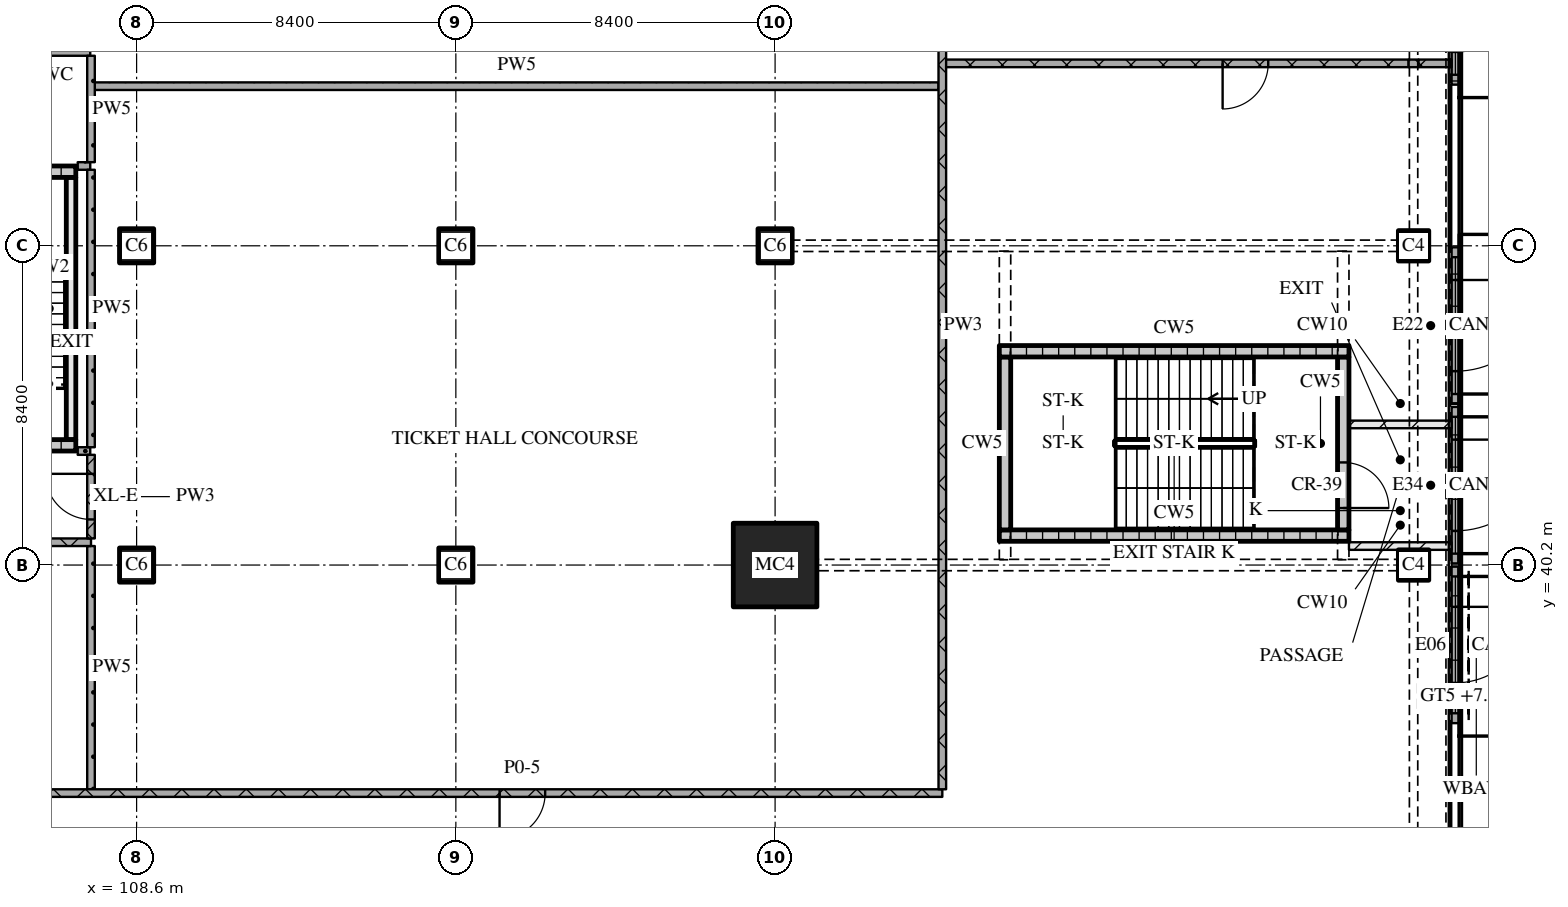
"""IFC4 building model, lengths in metres.
Left out: names, types, materials, properties, quantities, classifications, styles, units other than length and angle.
Written with IfcOpenShell. Run it as: python <this file> out.ifc"""

import sys

from ifc_helpers import new_model, si_unit, direction, frame, frame_2d, origin, origin_2d, place, context, subcontext, project, spatial, rectangle, extrude, element, fill, save


model = new_model("IFC4")
c1 = context("Model", 3, precision=1e-05, world=origin(), true_north=direction((0.0, 1.0)))
c2 = subcontext(c1, "Body", "Model", "MODEL_VIEW")
j1 = project(units=[si_unit("LENGTHUNIT", "METRE"), si_unit("PLANEANGLEUNIT", "RADIAN")], contexts=[c1])
p1 = place(None, origin())
s1 = spatial("IfcSite", under=j1, at=p1, CompositionType="ELEMENT")
p2 = place(p1, origin())
s2 = spatial("IfcBuilding", under=s1, at=p2, CompositionType="ELEMENT")
p3 = place(p2, origin())
s3 = spatial("IfcBuildingStorey", under=s2, at=p3, CompositionType="ELEMENT", Elevation=0.0)
for number, where, z_axis, x_axis in (
    (1, (108.6, 40.2, 0.0), (0.0, 0.0, 1.0), (1.0, 0.0, 0.0)),
    (2, (108.6, 48.6, 0.0), (0.0, 0.0, 1.0), (1.0, 0.0, 0.0)),
    (3, (117.0, 40.2, 0.0), (0.0, 0.0, 1.0), (1.0, 0.0, 0.0)),
    (4, (117.0, 48.6, 0.0), (0.0, 0.0, 1.0), (1.0, 0.0, 0.0)),
):
    element("IfcColumn", number, at=place(p3, frame(where, z_axis=z_axis, x_axis=x_axis)), inside=s3, PredefinedType="COLUMN", context=c2, shape_type="SweptSolid", body=[
        extrude(rectangle(XDim=0.9, YDim=0.9, at=origin_2d()), origin(), (0.0, 0.0, 1.0), 9.0),
    ])
p4 = place(p3, frame((125.4, 40.2, 0.0), z_axis=(0.0, 0.0, 1.0), x_axis=(1.0, 0.0, 0.0)))
e5 = element("IfcColumn", 5, at=p4, inside=s3, PredefinedType="COLUMN", context=c2, shape_type="SweptSolid", body=[
    extrude(rectangle(XDim=2.2, YDim=2.2, at=origin_2d()), origin(), (0.0, 0.0, 1.0), 9.0),
])
p5 = place(p3, frame((125.4, 48.6, 0.0), z_axis=(0.0, 0.0, 1.0), x_axis=(1.0, 0.0, 0.0)))
e6 = element("IfcColumn", 6, at=p5, inside=s3, PredefinedType="COLUMN", context=c2, shape_type="SweptSolid", body=[
    extrude(rectangle(XDim=0.9, YDim=0.9, at=origin_2d()), origin(), (0.0, 0.0, 1.0), 9.0),
])
for number, where, z_axis, x_axis in (
    (7, (142.2, 40.2, 0.0), (0.0, 0.0, 1.0), (1.0, 0.0, 0.0)),
    (8, (142.2, 48.6, 0.0), (0.0, 0.0, 1.0), (1.0, 0.0, 0.0)),
):
    element("IfcColumn", number, at=place(p3, frame(where, z_axis=z_axis, x_axis=x_axis)), inside=s3, PredefinedType="COLUMN", context=c2, shape_type="SweptSolid", body=[
        extrude(rectangle(XDim=0.8, YDim=0.8, at=origin_2d()), origin(), (0.0, 0.0, 1.0), 9.0),
    ])
p6 = place(p3, frame((143.3, 40.16, 0.0), z_axis=(0.0, 0.0, 1.0), x_axis=(0.0, -1.0, 0.0)))
e9 = element("IfcWall", 9, at=p6, inside=s3, PredefinedType="SOLIDWALL", context=c2, shape_type="SweptSolid", body=[
    extrude(rectangle(XDim=4.12, YDim=0.2, at=frame_2d((2.06, 0.0))), origin(), (0.0, 0.0, 1.0), 8.7),
])
p7 = place(p6, frame((1.06, 0.0, 0.0)))
e10 = element("IfcOpeningElement", 10, at=p7, cuts=e9, PredefinedType="OPENING", context=c2, shape_type="SweptSolid", body=[
    extrude(rectangle(XDim=2.0, YDim=2.4, at=frame_2d((1.0, 1.2))), frame((0.0, 0.11, 0.0), z_axis=(0.0, -1.0, 0.0), x_axis=(1.0, 0.0, 0.0)), (0.0, 0.0, 1.0), 0.22),
])
p8 = place(p6, frame((0.26, 0.0, 2.7)))
e11 = element("IfcOpeningElement", 11, at=p8, cuts=e9, PredefinedType="OPENING", context=c2, shape_type="SweptSolid", body=[
    extrude(rectangle(XDim=3.6, YDim=5.6, at=frame_2d((1.8, 2.8))), frame((0.0, 0.11, 0.0), z_axis=(0.0, -1.0, 0.0), x_axis=(1.0, 0.0, 0.0)), (0.0, 0.0, 1.0), 0.22),
])
p9 = place(p3, frame((143.3, 56.96, 0.0), z_axis=(0.0, 0.0, 1.0), x_axis=(0.0, -1.0, 0.0)))
e12 = element("IfcWall", 12, at=p9, inside=s3, PredefinedType="SOLIDWALL", context=c2, shape_type="SweptSolid", body=[
    extrude(rectangle(XDim=4.12, YDim=0.2, at=frame_2d((2.06, 0.0))), origin(), (0.0, 0.0, 1.0), 8.7),
])
p10 = place(p9, frame((0.86, 0.0, 0.0)))
e13 = element("IfcOpeningElement", 13, at=p10, cuts=e12, PredefinedType="OPENING", context=c2, shape_type="SweptSolid", body=[
    extrude(rectangle(XDim=2.4, YDim=2.4, at=frame_2d((1.2, 1.2))), frame((0.0, 0.11, 0.0), z_axis=(0.0, -1.0, 0.0), x_axis=(1.0, 0.0, 0.0)), (0.0, 0.0, 1.0), 0.22),
])
p11 = place(p9, frame((0.26, 0.0, 2.7)))
e14 = element("IfcOpeningElement", 14, at=p11, cuts=e12, PredefinedType="OPENING", context=c2, shape_type="SweptSolid", body=[
    extrude(rectangle(XDim=3.6, YDim=5.6, at=frame_2d((1.8, 2.8))), frame((0.0, 0.11, 0.0), z_axis=(0.0, -1.0, 0.0), x_axis=(1.0, 0.0, 0.0)), (0.0, 0.0, 1.0), 0.22),
])
p12 = place(p3, frame((143.3, 48.56, 0.0), z_axis=(0.0, 0.0, 1.0), x_axis=(0.0, -1.0, 0.0)))
e15 = element("IfcWall", 15, at=p12, inside=s3, PredefinedType="SOLIDWALL", context=c2, shape_type="SweptSolid", body=[
    extrude(rectangle(XDim=4.12, YDim=0.2, at=frame_2d((2.06, 0.0))), origin(), (0.0, 0.0, 1.0), 8.7),
])
p13 = place(p12, frame((0.86, 0.0, 0.0)))
e16 = element("IfcOpeningElement", 16, at=p13, cuts=e15, PredefinedType="OPENING", context=c2, shape_type="SweptSolid", body=[
    extrude(rectangle(XDim=2.4, YDim=2.4, at=frame_2d((1.2, 1.2))), frame((0.0, 0.11, 0.0), z_axis=(0.0, -1.0, 0.0), x_axis=(1.0, 0.0, 0.0)), (0.0, 0.0, 1.0), 0.22),
])
p14 = place(p12, frame((0.26, 0.0, 2.7)))
e17 = element("IfcOpeningElement", 17, at=p14, cuts=e15, PredefinedType="OPENING", context=c2, shape_type="SweptSolid", body=[
    extrude(rectangle(XDim=3.6, YDim=5.6, at=frame_2d((1.8, 2.8))), frame((0.0, 0.11, 0.0), z_axis=(0.0, -1.0, 0.0), x_axis=(1.0, 0.0, 0.0)), (0.0, 0.0, 1.0), 0.22),
])
p15 = place(p3, frame((143.3, 44.36, 0.0), z_axis=(0.0, 0.0, 1.0), x_axis=(0.0, -1.0, 0.0)))
e18 = element("IfcWall", 18, at=p15, inside=s3, PredefinedType="SOLIDWALL", context=c2, shape_type="SweptSolid", body=[
    extrude(rectangle(XDim=4.12, YDim=0.2, at=frame_2d((2.06, 0.0))), origin(), (0.0, 0.0, 1.0), 8.7),
])
p16 = place(p15, frame((0.86, 0.0, 0.0)))
e19 = element("IfcOpeningElement", 19, at=p16, cuts=e18, PredefinedType="OPENING", context=c2, shape_type="SweptSolid", body=[
    extrude(rectangle(XDim=2.4, YDim=2.4, at=frame_2d((1.2, 1.2))), frame((0.0, 0.11, 0.0), z_axis=(0.0, -1.0, 0.0), x_axis=(1.0, 0.0, 0.0)), (0.0, 0.0, 1.0), 0.22),
])
p17 = place(p15, frame((0.26, 0.0, 2.7)))
e20 = element("IfcOpeningElement", 20, at=p17, cuts=e18, PredefinedType="OPENING", context=c2, shape_type="SweptSolid", body=[
    extrude(rectangle(XDim=3.6, YDim=5.6, at=frame_2d((1.8, 2.8))), frame((0.0, 0.11, 0.0), z_axis=(0.0, -1.0, 0.0), x_axis=(1.0, 0.0, 0.0)), (0.0, 0.0, 1.0), 0.22),
])
p18 = place(p3, frame((101.4, 43.35, 0.0), z_axis=(0.0, 0.0, 1.0), x_axis=(1.0, 0.0, 0.0)))
e21 = element("IfcWall", 21, at=p18, inside=s3, PredefinedType="SOLIDWALL", context=c2, shape_type="SweptSolid", body=[
    extrude(rectangle(XDim=5.6, YDim=0.3, at=frame_2d((2.8, 0.0))), origin(), (0.0, 0.0, 1.0), 8.7),
])
p19 = place(p18, frame((0.725, 0.0, 0.0)))
e22 = element("IfcOpeningElement", 22, at=p19, cuts=e21, PredefinedType="OPENING", context=c2, shape_type="SweptSolid", body=[
    extrude(rectangle(XDim=1.0, YDim=2.1, at=frame_2d((0.5, 1.05))), frame((0.0, 0.16, 0.0), z_axis=(0.0, -1.0, 0.0), x_axis=(1.0, 0.0, 0.0)), (0.0, 0.0, 1.0), 0.32),
])
p20 = place(p3, frame((106.875, 43.5, 0.0), z_axis=(0.0, 0.0, 1.0), x_axis=(0.0, 1.0, 0.0)))
e23 = element("IfcWall", 23, at=p20, inside=s3, PredefinedType="SOLIDWALL", context=c2, shape_type="SweptSolid", body=[
    extrude(rectangle(XDim=6.9, YDim=0.25, at=frame_2d((3.45, 0.0))), origin(), (0.0, 0.0, 1.0), 8.7),
])
p21 = place(p3, frame((101.4, 50.55, 0.0), z_axis=(0.0, 0.0, 1.0), x_axis=(1.0, 0.0, 0.0)))
e24 = element("IfcWall", 24, at=p21, inside=s3, PredefinedType="SOLIDWALL", context=c2, shape_type="SweptSolid", body=[
    extrude(rectangle(XDim=5.6, YDim=0.3, at=frame_2d((2.8, 0.0))), origin(), (0.0, 0.0, 1.0), 8.7),
])
p22 = place(p3, frame((131.3, 40.975, 0.0), z_axis=(0.0, 0.0, 1.0), x_axis=(1.0, 0.0, 0.0)))
e25 = element("IfcWall", 25, at=p22, inside=s3, PredefinedType="SOLIDWALL", context=c2, shape_type="SweptSolid", body=[
    extrude(rectangle(XDim=9.2, YDim=0.3, at=frame_2d((4.6, 0.0))), origin(), (0.0, 0.0, 1.0), 8.7),
])
p23 = place(p3, frame((131.45, 41.125, 0.0), z_axis=(0.0, 0.0, 1.0), x_axis=(0.0, 1.0, 0.0)))
e26 = element("IfcWall", 26, at=p23, inside=s3, PredefinedType="SOLIDWALL", context=c2, shape_type="SweptSolid", body=[
    extrude(rectangle(XDim=4.55, YDim=0.3, at=frame_2d((2.275, 0.0))), origin(), (0.0, 0.0, 1.0), 8.7),
])
p24 = place(p3, frame((140.35, 41.125, 0.0), z_axis=(0.0, 0.0, 1.0), x_axis=(0.0, 1.0, 0.0)))
e27 = element("IfcWall", 27, at=p24, inside=s3, PredefinedType="SOLIDWALL", context=c2, shape_type="SweptSolid", body=[
    extrude(rectangle(XDim=4.55, YDim=0.3, at=frame_2d((2.275, 0.0))), origin(), (0.0, 0.0, 1.0), 8.7),
])
p25 = place(p24, frame((0.575, 0.0, 0.0)))
e28 = element("IfcOpeningElement", 28, at=p25, cuts=e27, PredefinedType="OPENING", context=c2, shape_type="SweptSolid", body=[
    extrude(rectangle(XDim=1.2, YDim=2.1, at=frame_2d((0.6, 1.05))), frame((0.0, 0.16, 0.0), z_axis=(0.0, -1.0, 0.0), x_axis=(1.0, 0.0, 0.0)), (0.0, 0.0, 1.0), 0.32),
])
p26 = place(p3, frame((131.3, 45.825, 0.0), z_axis=(0.0, 0.0, 1.0), x_axis=(1.0, 0.0, 0.0)))
e29 = element("IfcWall", 29, at=p26, inside=s3, PredefinedType="SOLIDWALL", context=c2, shape_type="SweptSolid", body=[
    extrude(rectangle(XDim=9.2, YDim=0.3, at=frame_2d((4.6, 0.0))), origin(), (0.0, 0.0, 1.0), 8.7),
])
for number, where, z_axis, x_axis in (
    (30, (140.5, 40.7, 0.0), (0.0, 0.0, 1.0), (1.0, 0.0, 0.0)),
    (31, (140.5, 43.9, 0.0), (0.0, 0.0, 1.0), (1.0, 0.0, 0.0)),
):
    element("IfcWall", number, at=place(p3, frame(where, z_axis=z_axis, x_axis=x_axis)), inside=s3, PredefinedType="PARTITIONING", context=c2, shape_type="SweptSolid", body=[
        extrude(rectangle(XDim=2.7, YDim=0.2, at=frame_2d((1.35, 0.0))), origin(), (0.0, 0.0, 1.0), 8.7),
    ])
p27 = place(p3, frame((129.8, 53.4, 0.0), z_axis=(0.0, 0.0, 1.0), x_axis=(1.0, 0.0, 0.0)))
e32 = element("IfcWall", 32, at=p27, inside=s3, PredefinedType="PARTITIONING", context=c2, shape_type="SweptSolid", body=[
    extrude(rectangle(XDim=12.27, YDim=0.2, at=frame_2d((6.135, 0.0))), origin(), (0.0, 0.0, 1.0), 8.7),
])
p28 = place(p27, frame((7.375, 0.0, 0.0)))
e33 = element("IfcOpeningElement", 33, at=p28, cuts=e32, PredefinedType="OPENING", context=c2, shape_type="SweptSolid", body=[
    extrude(rectangle(XDim=1.2, YDim=2.1, at=frame_2d((0.6, 1.05))), frame((0.0, 0.11, 0.0), z_axis=(0.0, -1.0, 0.0), x_axis=(1.0, 0.0, 0.0)), (0.0, 0.0, 1.0), 0.22),
])
p29 = place(p3, frame((142.07, 53.4, 0.0), z_axis=(0.0, 0.0, 1.0), x_axis=(1.0, 0.0, 0.0)))
e34 = element("IfcWall", 34, at=p29, inside=s3, PredefinedType="PARTITIONING", context=c2, shape_type="SweptSolid", body=[
    extrude(rectangle(XDim=0.26, YDim=0.2, at=frame_2d((0.13, 0.0))), origin(), (0.0, 0.0, 1.0), 8.1),
])
p30 = place(p3, frame((142.33, 53.4, 0.0), z_axis=(0.0, 0.0, 1.0), x_axis=(1.0, 0.0, 0.0)))
e35 = element("IfcWall", 35, at=p30, inside=s3, PredefinedType="PARTITIONING", context=c2, shape_type="SweptSolid", body=[
    extrude(rectangle(XDim=0.87, YDim=0.2, at=frame_2d((0.435, 0.0))), origin(), (0.0, 0.0, 1.0), 8.7),
])
p31 = place(p3, frame((45.4, 34.2, 0.0), z_axis=(0.0, 0.0, 1.0), x_axis=(1.0, 0.0, 0.0)))
e36 = element("IfcWall", 36, at=p31, inside=s3, PredefinedType="PARTITIONING", context=c2, shape_type="SweptSolid", body=[
    extrude(rectangle(XDim=84.4, YDim=0.2, at=frame_2d((42.2, 0.0))), origin(), (0.0, 0.0, 1.0), 8.7),
])
p32 = place(p31, frame((27.5, 0.0, 0.0)))
e37 = element("IfcOpeningElement", 37, at=p32, cuts=e36, PredefinedType="OPENING", context=c2, shape_type="SweptSolid", body=[
    extrude(rectangle(XDim=1.2, YDim=2.1, at=frame_2d((0.6, 1.05))), frame((0.0, 0.11, 0.0), z_axis=(0.0, -1.0, 0.0), x_axis=(1.0, 0.0, 0.0)), (0.0, 0.0, 1.0), 0.22),
])
p33 = place(p31, frame((41.5, 0.0, 0.0)))
e38 = element("IfcOpeningElement", 38, at=p33, cuts=e36, PredefinedType="OPENING", context=c2, shape_type="SweptSolid", body=[
    extrude(rectangle(XDim=1.2, YDim=2.1, at=frame_2d((0.6, 1.05))), frame((0.0, 0.11, 0.0), z_axis=(0.0, -1.0, 0.0), x_axis=(1.0, 0.0, 0.0)), (0.0, 0.0, 1.0), 0.22),
])
p34 = place(p31, frame((55.6, 0.0, 0.0)))
e39 = element("IfcOpeningElement", 39, at=p34, cuts=e36, PredefinedType="OPENING", context=c2, shape_type="SweptSolid", body=[
    extrude(rectangle(XDim=1.2, YDim=2.1, at=frame_2d((0.6, 1.05))), frame((0.0, 0.11, 0.0), z_axis=(0.0, -1.0, 0.0), x_axis=(1.0, 0.0, 0.0)), (0.0, 0.0, 1.0), 0.22),
])
p35 = place(p31, frame((72.75, 0.0, 0.0)))
e40 = element("IfcOpeningElement", 40, at=p35, cuts=e36, PredefinedType="OPENING", context=c2, shape_type="SweptSolid", body=[
    extrude(rectangle(XDim=1.2, YDim=2.1, at=frame_2d((0.6, 1.05))), frame((0.0, 0.11, 0.0), z_axis=(0.0, -1.0, 0.0), x_axis=(1.0, 0.0, 0.0)), (0.0, 0.0, 1.0), 0.22),
])
p36 = place(p3, frame((100.2, 40.8, 0.0), z_axis=(0.0, 0.0, 1.0), x_axis=(1.0, 0.0, 0.0)))
e41 = element("IfcWall", 41, at=p36, inside=s3, PredefinedType="PARTITIONING", context=c2, shape_type="SweptSolid", body=[
    extrude(rectangle(XDim=7.2, YDim=0.2, at=frame_2d((3.6, 0.0))), origin(), (0.0, 0.0, 1.0), 8.7),
])
for number, where, z_axis, x_axis in (
    (42, (107.05, 43.2, 0.0), (0.0, 0.0, 1.0), (1.0, 0.0, 0.0)),
    (43, (107.05, 50.7, 0.0), (0.0, 0.0, 1.0), (1.0, 0.0, 0.0)),
):
    element("IfcWall", number, at=place(p3, frame(where, z_axis=z_axis, x_axis=x_axis)), inside=s3, PredefinedType="PARTITIONING", context=c2, shape_type="SweptSolid", body=[
        extrude(rectangle(XDim=0.33, YDim=0.2, at=frame_2d((0.165, 0.0))), origin(), (0.0, 0.0, 1.0), 8.7),
    ])
p37 = place(p3, frame((107.5, 52.8, 0.0), z_axis=(0.0, 0.0, 1.0), x_axis=(1.0, 0.0, 0.0)))
e44 = element("IfcWall", 44, at=p37, inside=s3, PredefinedType="PARTITIONING", context=c2, shape_type="SweptSolid", body=[
    extrude(rectangle(XDim=22.2, YDim=0.2, at=frame_2d((11.1, 0.0))), origin(), (0.0, 0.0, 1.0), 8.7),
])
p38 = place(p3, frame((101.42, 53.7, 0.0), z_axis=(0.0, 0.0, 1.0), x_axis=(1.0, 0.0, 0.0)))
e45 = element("IfcWall", 45, at=p38, inside=s3, PredefinedType="PARTITIONING", context=c2, shape_type="SweptSolid", body=[
    extrude(rectangle(XDim=5.96, YDim=0.2, at=frame_2d((2.98, 0.0))), origin(), (0.0, 0.0, 1.0), 8.7),
])
p39 = place(p3, frame((107.4, 43.1, 0.0), z_axis=(0.0, 0.0, 1.0), x_axis=(0.0, -1.0, 0.0)))
e46 = element("IfcWall", 46, at=p39, inside=s3, PredefinedType="PARTITIONING", context=c2, shape_type="SweptSolid", body=[
    extrude(rectangle(XDim=2.2, YDim=0.2, at=frame_2d((1.1, 0.0))), origin(), (0.0, 0.0, 1.0), 8.7),
])
p40 = place(p39, frame((0.5, 0.0, 0.0)))
e47 = element("IfcOpeningElement", 47, at=p40, cuts=e46, PredefinedType="OPENING", context=c2, shape_type="SweptSolid", body=[
    extrude(rectangle(XDim=1.2, YDim=2.1, at=frame_2d((0.6, 1.05))), frame((0.0, 0.11, 0.0), z_axis=(0.0, -1.0, 0.0), x_axis=(1.0, 0.0, 0.0)), (0.0, 0.0, 1.0), 0.22),
])
p41 = place(p3, frame((107.4, 50.6, 0.0), z_axis=(0.0, 0.0, 1.0), x_axis=(0.0, -1.0, 0.0)))
e48 = element("IfcWall", 48, at=p41, inside=s3, PredefinedType="PARTITIONING", context=c2, shape_type="SweptSolid", body=[
    extrude(rectangle(XDim=7.3, YDim=0.2, at=frame_2d((3.65, 0.0))), origin(), (0.0, 0.0, 1.0), 8.7),
])
p42 = place(p3, frame((107.4, 40.7, 0.0), z_axis=(0.0, 0.0, 1.0), x_axis=(0.0, -1.0, 0.0)))
e49 = element("IfcWall", 49, at=p42, inside=s3, PredefinedType="PARTITIONING", context=c2, shape_type="SweptSolid", body=[
    extrude(rectangle(XDim=6.4, YDim=0.2, at=frame_2d((3.2, 0.0))), origin(), (0.0, 0.0, 1.0), 8.7),
])
p43 = place(p3, frame((107.4, 53.6, 0.0), z_axis=(0.0, 0.0, 1.0), x_axis=(0.0, -1.0, 0.0)))
e50 = element("IfcWall", 50, at=p43, inside=s3, PredefinedType="PARTITIONING", context=c2, shape_type="SweptSolid", body=[
    extrude(rectangle(XDim=2.8, YDim=0.2, at=frame_2d((1.4, 0.0))), origin(), (0.0, 0.0, 1.0), 8.7),
])
p44 = place(p3, frame((129.8, 58.7, 0.0), z_axis=(0.0, 0.0, 1.0), x_axis=(0.0, -1.0, 0.0)))
e51 = element("IfcWall", 51, at=p44, inside=s3, PredefinedType="PARTITIONING", context=c2, shape_type="SweptSolid", body=[
    extrude(rectangle(XDim=24.4, YDim=0.2, at=frame_2d((12.2, 0.0))), origin(), (0.0, 0.0, 1.0), 8.7),
])
p45 = place(p7, origin())
e52 = element("IfcDoor", 52, at=p45, inside=s3, OperationType="DOUBLE_DOOR_SINGLE_SWING", PredefinedType="GATE", context=c2, shape_type="SweptSolid", body=[
    extrude(rectangle(XDim=2.0, YDim=2.4, at=frame_2d((1.0, 1.2))), frame((0.0, 0.025, 0.0), z_axis=(0.0, -1.0, 0.0), x_axis=(1.0, 0.0, 0.0)), (0.0, 0.0, 1.0), 0.05),
])
fill(e10, e52)
p46 = place(p8, origin())
e53 = element("IfcWindow", 53, at=p46, inside=s3, PartitioningType="SINGLE_PANEL", PredefinedType="WINDOW", context=c2, shape_type="SweptSolid", body=[
    extrude(rectangle(XDim=3.6, YDim=5.6, at=frame_2d((1.8, 2.8))), frame((0.0, 0.03, 0.0), z_axis=(0.0, -1.0, 0.0), x_axis=(1.0, 0.0, 0.0)), (0.0, 0.0, 1.0), 0.06),
])
fill(e11, e53)
p47 = place(p11, origin())
e54 = element("IfcWindow", 54, at=p47, inside=s3, PartitioningType="SINGLE_PANEL", PredefinedType="WINDOW", context=c2, shape_type="SweptSolid", body=[
    extrude(rectangle(XDim=3.6, YDim=5.6, at=frame_2d((1.8, 2.8))), frame((0.0, 0.03, 0.0), z_axis=(0.0, -1.0, 0.0), x_axis=(1.0, 0.0, 0.0)), (0.0, 0.0, 1.0), 0.06),
])
fill(e14, e54)
p48 = place(p13, origin())
e55 = element("IfcDoor", 55, at=p48, inside=s3, OperationType="DOUBLE_DOOR_SINGLE_SWING", PredefinedType="DOOR", context=c2, shape_type="SweptSolid", body=[
    extrude(rectangle(XDim=2.4, YDim=2.4, at=frame_2d((1.2, 1.2))), frame((0.0, 0.025, 0.0), z_axis=(0.0, -1.0, 0.0), x_axis=(1.0, 0.0, 0.0)), (0.0, 0.0, 1.0), 0.05),
])
fill(e16, e55)
p49 = place(p14, origin())
e56 = element("IfcWindow", 56, at=p49, inside=s3, PartitioningType="SINGLE_PANEL", PredefinedType="WINDOW", context=c2, shape_type="SweptSolid", body=[
    extrude(rectangle(XDim=3.6, YDim=5.6, at=frame_2d((1.8, 2.8))), frame((0.0, 0.03, 0.0), z_axis=(0.0, -1.0, 0.0), x_axis=(1.0, 0.0, 0.0)), (0.0, 0.0, 1.0), 0.06),
])
fill(e17, e56)
p50 = place(p16, origin())
e57 = element("IfcDoor", 57, at=p50, inside=s3, OperationType="DOUBLE_DOOR_SINGLE_SWING", PredefinedType="DOOR", context=c2, shape_type="SweptSolid", body=[
    extrude(rectangle(XDim=2.4, YDim=2.4, at=frame_2d((1.2, 1.2))), frame((0.0, 0.025, 0.0), z_axis=(0.0, -1.0, 0.0), x_axis=(1.0, 0.0, 0.0)), (0.0, 0.0, 1.0), 0.05),
])
fill(e19, e57)
p51 = place(p17, origin())
e58 = element("IfcWindow", 58, at=p51, inside=s3, PartitioningType="SINGLE_PANEL", PredefinedType="WINDOW", context=c2, shape_type="SweptSolid", body=[
    extrude(rectangle(XDim=3.6, YDim=5.6, at=frame_2d((1.8, 2.8))), frame((0.0, 0.03, 0.0), z_axis=(0.0, -1.0, 0.0), x_axis=(1.0, 0.0, 0.0)), (0.0, 0.0, 1.0), 0.06),
])
fill(e20, e58)
p52 = place(p25, origin())
e59 = element("IfcDoor", 59, at=p52, inside=s3, OperationType="SINGLE_SWING_RIGHT", PredefinedType="DOOR", context=c2, shape_type="SweptSolid", body=[
    extrude(rectangle(XDim=1.2, YDim=2.1, at=frame_2d((0.6, 1.05))), frame((0.0, 0.025, 0.0), z_axis=(0.0, -1.0, 0.0), x_axis=(1.0, 0.0, 0.0)), (0.0, 0.0, 1.0), 0.05),
])
fill(e28, e59)
p53 = place(p28, origin())
e60 = element("IfcDoor", 60, at=p53, inside=s3, OperationType="SINGLE_SWING_RIGHT", PredefinedType="DOOR", context=c2, shape_type="SweptSolid", body=[
    extrude(rectangle(XDim=1.2, YDim=2.1, at=frame_2d((0.6, 1.05))), frame((0.0, 0.025, 0.0), z_axis=(0.0, -1.0, 0.0), x_axis=(1.0, 0.0, 0.0)), (0.0, 0.0, 1.0), 0.05),
])
fill(e33, e60)
p54 = place(p35, origin())
e61 = element("IfcDoor", 61, at=p54, inside=s3, OperationType="SINGLE_SWING_RIGHT", PredefinedType="DOOR", context=c2, shape_type="SweptSolid", body=[
    extrude(rectangle(XDim=1.2, YDim=2.1, at=frame_2d((0.6, 1.05))), frame((0.0, 0.025, 0.0), z_axis=(0.0, -1.0, 0.0), x_axis=(1.0, 0.0, 0.0)), (0.0, 0.0, 1.0), 0.05),
])
fill(e40, e61)
p55 = place(p40, origin())
e62 = element("IfcDoor", 62, at=p55, inside=s3, OperationType="SINGLE_SWING_RIGHT", PredefinedType="DOOR", context=c2, shape_type="SweptSolid", body=[
    extrude(rectangle(XDim=1.2, YDim=2.1, at=frame_2d((0.6, 1.05))), frame((0.0, 0.025, 0.0), z_axis=(0.0, -1.0, 0.0), x_axis=(1.0, 0.0, 0.0)), (0.0, 0.0, 1.0), 0.05),
])
fill(e47, e62)
save(model, sys.argv[1])
